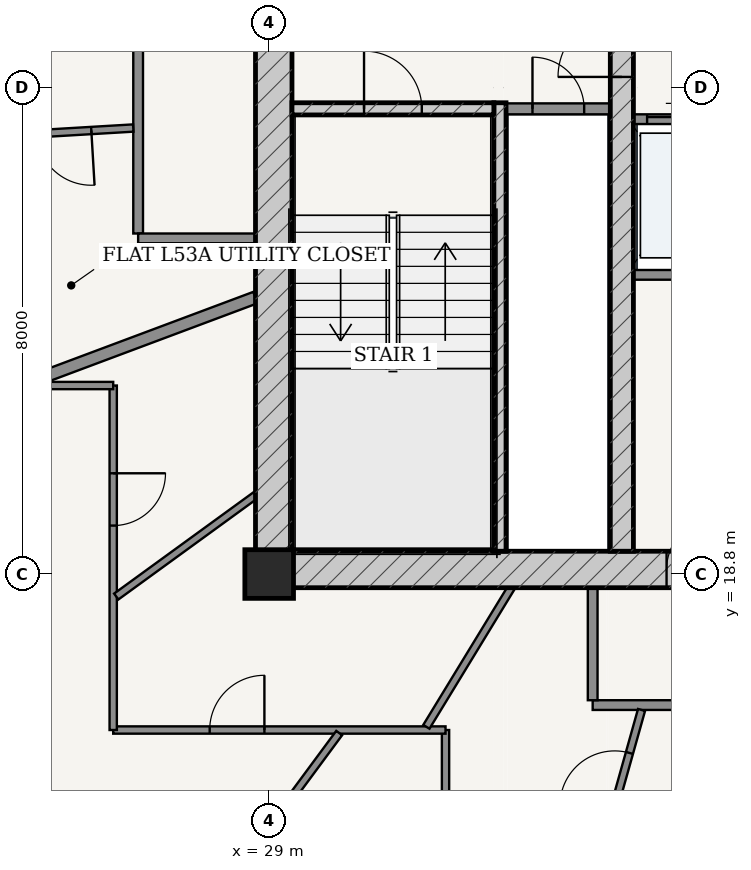
"""IFC4 building model, lengths in metres.
Left out: names, types, materials, properties, quantities, classifications, styles, units other than length and angle.
Written with IfcOpenShell. Run it as: python <this file> out.ifc"""

import sys

from ifc_helpers import new_model, si_unit, direction, frame, frame_2d, origin, origin_2d, place, context, subcontext, project, spatial, rectangle, extrude, source, transform, mapped, element, fill, save


model = new_model("IFC4")
c1 = context("Model", 3, precision=1e-05, world=origin(), true_north=direction((-0.2419218956, 0.970295726276)))
c2 = subcontext(c1, "Body", "Model", "MODEL_VIEW")
j1 = project(units=[si_unit("LENGTHUNIT", "METRE"), si_unit("PLANEANGLEUNIT", "RADIAN")], contexts=[c1])
p1 = place(None, origin())
s1 = spatial("IfcSite", under=j1, at=p1, CompositionType="ELEMENT")
p2 = place(p1, origin())
s2 = spatial("IfcBuilding", under=s1, at=p2, CompositionType="ELEMENT")
p3 = place(p2, frame((0.0, 0.0, 202.3)))
s3 = spatial("IfcBuildingStorey", under=s2, at=p3, CompositionType="ELEMENT", Elevation=202.3)
p4 = place(p3, frame((29.0, 18.8, 0.0), z_axis=(0.0, 0.0, 1.0), x_axis=(1.0, 0.0, 0.0)))
e1 = element("IfcColumn", 1, at=p4, inside=s3, PredefinedType="COLUMN", context=c2, shape_type="SweptSolid", body=[
    extrude(rectangle(XDim=0.8, YDim=0.8, at=origin_2d()), origin(), (0.0, 0.0, 1.0), 3.7),
])
p5 = place(p3, frame((28.775, 18.875, 0.0), z_axis=(0.0, 0.0, 1.0), x_axis=(1.0, 0.0, 0.0)))
e2 = element("IfcWall", 2, at=p5, inside=s3, PredefinedType="SHEAR", context=c2, shape_type="SweptSolid", body=[
    extrude(rectangle(XDim=18.45, YDim=0.6, at=frame_2d((9.225, 0.0))), origin(), (0.0, 0.0, 1.0), 3.435),
])
p6 = place(p5, frame((6.76, 0.0, 0.0)))
e3 = element("IfcOpeningElement", 3, at=p6, cuts=e2, PredefinedType="OPENING", context=c2, shape_type="SweptSolid", body=[
    extrude(rectangle(XDim=0.85, YDim=2.1, at=frame_2d((0.425, 1.05))), frame((0.0, 0.31, 0.0), z_axis=(0.0, -1.0, 0.0), x_axis=(1.0, 0.0, 0.0)), (0.0, 0.0, 1.0), 0.62),
])
p7 = place(p5, frame((8.8, 0.0, 0.0)))
e4 = element("IfcOpeningElement", 4, at=p7, cuts=e2, PredefinedType="OPENING", context=c2, shape_type="SweptSolid", body=[
    extrude(rectangle(XDim=0.85, YDim=2.1, at=frame_2d((0.425, 1.05))), frame((0.0, 0.31, 0.0), z_axis=(0.0, -1.0, 0.0), x_axis=(1.0, 0.0, 0.0)), (0.0, 0.0, 1.0), 0.62),
])
p8 = place(p5, frame((10.84, 0.0, 0.0)))
e5 = element("IfcOpeningElement", 5, at=p8, cuts=e2, PredefinedType="OPENING", context=c2, shape_type="SweptSolid", body=[
    extrude(rectangle(XDim=0.85, YDim=2.1, at=frame_2d((0.425, 1.05))), frame((0.0, 0.31, 0.0), z_axis=(0.0, -1.0, 0.0), x_axis=(1.0, 0.0, 0.0)), (0.0, 0.0, 1.0), 0.62),
])
p9 = place(p3, frame((29.075, 19.175, 0.0), z_axis=(0.0, 0.0, 1.0), x_axis=(0.0, 1.0, 0.0)))
e6 = element("IfcWall", 6, at=p9, inside=s3, PredefinedType="SHEAR", context=c2, shape_type="SweptSolid", body=[
    extrude(rectangle(XDim=15.25, YDim=0.6, at=frame_2d((7.625, 0.0))), origin(), (0.0, 0.0, 1.0), 3.435),
])
p10 = place(p9, frame((9.875, 0.0, 0.0)))
e7 = element("IfcOpeningElement", 7, at=p10, cuts=e6, PredefinedType="OPENING", context=c2, shape_type="SweptSolid", body=[
    extrude(rectangle(XDim=1.5, YDim=2.2, at=frame_2d((0.75, 1.1))), frame((0.0, 0.31, 0.0), z_axis=(0.0, -1.0, 0.0), x_axis=(1.0, 0.0, 0.0)), (0.0, 0.0, 1.0), 0.62),
])
p11 = place(p3, frame((32.795, 19.175, 0.0), z_axis=(0.0, 0.0, 1.0), x_axis=(0.0, 1.0, 0.0)))
e8 = element("IfcWall", 8, at=p11, inside=s3, PredefinedType="SOLIDWALL", context=c2, shape_type="SweptSolid", body=[
    extrude(rectangle(XDim=7.375, YDim=0.2, at=frame_2d((3.688, 0.0))), origin(), (0.0, 0.0, 1.0), 3.435),
])
p12 = place(p3, frame((29.375, 26.45, 0.0), z_axis=(0.0, 0.0, 1.0), x_axis=(1.0, 0.0, 0.0)))
e9 = element("IfcWall", 9, at=p12, inside=s3, PredefinedType="SOLIDWALL", context=c2, shape_type="SweptSolid", body=[
    extrude(rectangle(XDim=3.32, YDim=0.2, at=frame_2d((1.66, 0.0))), origin(), (0.0, 0.0, 1.0), 3.435),
])
p13 = place(p12, frame((1.185, 0.0, 0.0)))
e10 = element("IfcOpeningElement", 10, at=p13, cuts=e9, PredefinedType="OPENING", context=c2, shape_type="SweptSolid", body=[
    extrude(rectangle(XDim=0.95, YDim=2.15, at=frame_2d((0.475, 1.075))), frame((0.0, 0.11, 0.0), z_axis=(0.0, -1.0, 0.0), x_axis=(1.0, 0.0, 0.0)), (0.0, 0.0, 1.0), 0.22),
])
p14 = place(p3, frame((34.8, 19.175, 0.0), z_axis=(0.0, 0.0, 1.0), x_axis=(0.0, 1.0, 0.0)))
e11 = element("IfcWall", 11, at=p14, inside=s3, PredefinedType="SHEAR", context=c2, shape_type="SweptSolid", body=[
    extrude(rectangle(XDim=15.25, YDim=0.38, at=frame_2d((7.625, 0.0))), origin(), (0.0, 0.0, 1.0), 3.435),
])
p15 = place(p14, frame((7.8, 0.0, 0.0)))
e12 = element("IfcOpeningElement", 12, at=p15, cuts=e11, PredefinedType="OPENING", context=c2, shape_type="SweptSolid", body=[
    extrude(rectangle(XDim=1.05, YDim=2.15, at=frame_2d((0.525, 1.075))), frame((0.0, 0.2, 0.0), z_axis=(0.0, -1.0, 0.0), x_axis=(1.0, 0.0, 0.0)), (0.0, 0.0, 1.0), 0.4),
])
p16 = place(p3, frame((32.9, 26.45, 0.0), z_axis=(0.0, 0.0, 1.0), x_axis=(1.0, 0.0, 0.0)))
e13 = element("IfcWall", 13, at=p16, inside=s3, PredefinedType="PARTITIONING", context=c2, shape_type="SweptSolid", body=[
    extrude(rectangle(XDim=1.71, YDim=0.18, at=frame_2d((0.855, 0.0))), origin(), (0.0, 0.0, 1.0), 3.435),
])
p17 = place(p16, frame((0.43, 0.0, 0.0)))
e14 = element("IfcOpeningElement", 14, at=p17, cuts=e13, PredefinedType="OPENING", context=c2, shape_type="SweptSolid", body=[
    extrude(rectangle(XDim=0.85, YDim=2.1, at=frame_2d((0.425, 1.05))), frame((0.0, 0.1, 0.0), z_axis=(0.0, -1.0, 0.0), x_axis=(1.0, 0.0, 0.0)), (0.0, 0.0, 1.0), 0.2),
])
p18 = place(p3, frame((34.99, 26.28, 0.0), z_axis=(0.0, 0.0, 1.0), x_axis=(1.0, 0.0, 0.0)))
e15 = element("IfcWall", 15, at=p18, inside=s3, PredefinedType="PARTITIONING", context=c2, shape_type="SweptSolid", body=[
    extrude(rectangle(XDim=6.02, YDim=0.16, at=frame_2d((3.01, 0.0))), origin(), (0.0, 0.0, 1.0), 3.435),
])
p19 = place(p18, frame((0.225, 0.0, 0.0)))
e16 = element("IfcOpeningElement", 16, at=p19, cuts=e15, PredefinedType="OPENING", context=c2, shape_type="SweptSolid", body=[
    extrude(rectangle(XDim=1.1, YDim=2.2, at=frame_2d((0.55, 1.1))), frame((0.0, 0.09, 0.0), z_axis=(0.0, -1.0, 0.0), x_axis=(1.0, 0.0, 0.0)), (0.0, 0.0, 1.0), 0.18),
])
p20 = place(p18, frame((1.705, 0.0, 0.0)))
e17 = element("IfcOpeningElement", 17, at=p20, cuts=e15, PredefinedType="OPENING", context=c2, shape_type="SweptSolid", body=[
    extrude(rectangle(XDim=1.1, YDim=2.2, at=frame_2d((0.55, 1.1))), frame((0.0, 0.09, 0.0), z_axis=(0.0, -1.0, 0.0), x_axis=(1.0, 0.0, 0.0)), (0.0, 0.0, 1.0), 0.18),
])
p21 = place(p3, frame((34.99, 23.72, 0.0), z_axis=(0.0, 0.0, 1.0), x_axis=(1.0, 0.0, 0.0)))
e18 = element("IfcWall", 18, at=p21, inside=s3, PredefinedType="PARTITIONING", context=c2, shape_type="SweptSolid", body=[
    extrude(rectangle(XDim=6.02, YDim=0.16, at=frame_2d((3.01, 0.0))), origin(), (0.0, 0.0, 1.0), 3.435),
])
p22 = place(p3, frame((26.845, 24.4, 0.0), z_axis=(0.0, 0.0, 1.0), x_axis=(0.0, 1.0, 0.0)))
e19 = element("IfcWall", 19, at=p22, inside=s3, PredefinedType="PARTITIONING", context=c2, shape_type="SweptSolid", body=[
    extrude(rectangle(XDim=10.625, YDim=0.16, at=frame_2d((5.312, 0.0))), origin(), (0.0, 0.0, 1.0), 2.951),
])
p23 = place(p22, frame((6.927, 0.0, 0.0)))
e20 = element("IfcOpeningElement", 20, at=p23, cuts=e19, PredefinedType="OPENING", context=c2, shape_type="SweptSolid", body=[
    extrude(rectangle(XDim=0.98, YDim=2.2, at=frame_2d((0.49, 1.1))), frame((0.0, 0.09, 0.0), z_axis=(0.0, -1.0, 0.0), x_axis=(1.0, 0.0, 0.0)), (0.0, 0.0, 1.0), 0.18),
])
p24 = place(p3, frame((26.845, 24.32, 0.0), z_axis=(0.0, 0.0, 1.0), x_axis=(1.0, 0.0, 0.0)))
e21 = element("IfcWall", 21, at=p24, inside=s3, PredefinedType="PARTITIONING", context=c2, shape_type="SweptSolid", body=[
    extrude(rectangle(XDim=1.93, YDim=0.16, at=frame_2d((0.965, 0.0))), origin(), (0.0, 0.0, 1.0), 3.435),
])
p25 = place(p3, frame((34.32, 16.645, 0.0), z_axis=(0.0, 0.0, 1.0), x_axis=(1.0, 0.0, 0.0)))
e22 = element("IfcWall", 22, at=p25, inside=s3, PredefinedType="PARTITIONING", context=c2, shape_type="SweptSolid", body=[
    extrude(rectangle(XDim=14.835, YDim=0.16, at=frame_2d((7.417, 0.0))), origin(), (0.0, 0.0, 1.0), 2.951),
])
p26 = place(p25, frame((11.426, 0.0, 0.0)))
e23 = element("IfcOpeningElement", 23, at=p26, cuts=e22, PredefinedType="OPENING", context=c2, shape_type="SweptSolid", body=[
    extrude(rectangle(XDim=0.98, YDim=2.2, at=frame_2d((0.49, 1.1))), frame((0.0, 0.09, 0.0), z_axis=(0.0, -1.0, 0.0), x_axis=(1.0, 0.0, 0.0)), (0.0, 0.0, 1.0), 0.18),
])
p27 = place(p3, frame((34.32, 16.725, 0.0), z_axis=(0.0, 0.0, 1.0), x_axis=(0.0, 1.0, 0.0)))
e24 = element("IfcWall", 24, at=p27, inside=s3, PredefinedType="PARTITIONING", context=c2, shape_type="SweptSolid", body=[
    extrude(rectangle(XDim=1.85, YDim=0.16, at=frame_2d((0.925, 0.0))), origin(), (0.0, 0.0, 1.0), 3.435),
])
p28 = place(p3, frame((26.765, 26.135, 0.0), z_axis=(0.0, 0.0, 1.0), x_axis=(-0.998248453424, -0.059161011118, 0.0)))
e25 = element("IfcWall", 25, at=p28, inside=s3, PredefinedType="PARTITIONING", context=c2, shape_type="SweptSolid", body=[
    extrude(rectangle(XDim=2.282, YDim=0.12, at=frame_2d((1.141, 0.0))), origin(), (0.0, 0.0, 1.0), 3.435),
])
p29 = place(p28, frame((0.691, 0.0, 0.0)))
e26 = element("IfcOpeningElement", 26, at=p29, cuts=e25, PredefinedType="OPENING", context=c2, shape_type="SweptSolid", body=[
    extrude(rectangle(XDim=0.9, YDim=2.15, at=frame_2d((0.45, 1.075))), frame((0.0, 0.07, 0.0), z_axis=(0.0, -1.0, 0.0), x_axis=(1.0, 0.0, 0.0)), (0.0, 0.0, 1.0), 0.14),
])
p30 = place(p3, frame((28.775, 23.347, 0.0), z_axis=(0.0, 0.0, 1.0), x_axis=(-0.936537569358, -0.350567227761, 0.0)))
e27 = element("IfcWall", 27, at=p30, inside=s3, PredefinedType="PARTITIONING", context=c2, shape_type="SweptSolid", body=[
    extrude(rectangle(XDim=11.594, YDim=0.2, at=frame_2d((5.797, 0.0))), origin(), (0.0, 0.0, 1.0), 2.951),
])
p31 = place(p3, frame((31.9, 14.225, 0.0), z_axis=(0.0, 0.0, 1.0), x_axis=(0.0, 1.0, 0.0)))
e28 = element("IfcWall", 28, at=p31, inside=s3, PredefinedType="PARTITIONING", context=c2, shape_type="SweptSolid", body=[
    extrude(rectangle(XDim=2.01, YDim=0.12, at=frame_2d((1.005, 0.0))), origin(), (0.0, 0.0, 1.0), 3.11),
])
p32 = place(p3, frame((31.9, 16.235, 0.0), z_axis=(0.0, 0.0, 1.0), x_axis=(-1.0, 0.0, 0.0)))
e29 = element("IfcWall", 29, at=p32, inside=s3, PredefinedType="PARTITIONING", context=c2, shape_type="SweptSolid", body=[
    extrude(rectangle(XDim=5.465, YDim=0.12, at=frame_2d((2.732, 0.0))), origin(), (0.0, 0.0, 1.0), 2.951),
])
p33 = place(p32, frame((2.979, 0.0, 0.0)))
e30 = element("IfcOpeningElement", 30, at=p33, cuts=e29, PredefinedType="OPENING", context=c2, shape_type="SweptSolid", body=[
    extrude(rectangle(XDim=0.9, YDim=2.15, at=frame_2d((0.45, 1.075))), frame((0.0, 0.07, 0.0), z_axis=(0.0, -1.0, 0.0), x_axis=(1.0, 0.0, 0.0)), (0.0, 0.0, 1.0), 0.14),
])
p34 = place(p3, frame((26.435, 16.235, 0.0), z_axis=(0.0, 0.0, 1.0), x_axis=(0.0, 1.0, 0.0)))
e31 = element("IfcWall", 31, at=p34, inside=s3, PredefinedType="PARTITIONING", context=c2, shape_type="SweptSolid", body=[
    extrude(rectangle(XDim=5.665, YDim=0.12, at=frame_2d((2.833, 0.0))), origin(), (0.0, 0.0, 1.0), 2.951),
])
p35 = place(p34, frame((3.362, 0.0, 0.0)))
e32 = element("IfcOpeningElement", 32, at=p35, cuts=e31, PredefinedType="OPENING", context=c2, shape_type="SweptSolid", body=[
    extrude(rectangle(XDim=0.86, YDim=2.15, at=frame_2d((0.43, 1.075))), frame((0.0, 0.07, 0.0), z_axis=(0.0, -1.0, 0.0), x_axis=(1.0, 0.0, 0.0)), (0.0, 0.0, 1.0), 0.14),
])
p36 = place(p3, frame((26.435, 21.9, 0.0), z_axis=(0.0, 0.0, 1.0), x_axis=(-1.0, 0.0, 0.0)))
e33 = element("IfcWall", 33, at=p36, inside=s3, PredefinedType="PARTITIONING", context=c2, shape_type="SweptSolid", body=[
    extrude(rectangle(XDim=1.526, YDim=0.12, at=frame_2d((0.763, 0.0))), origin(), (0.0, 0.0, 1.0), 3.435),
])
p37 = place(p3, frame((30.151, 16.185, 0.0), z_axis=(0.0, 0.0, 1.0), x_axis=(-0.594540664599, -0.804065543434, 0.0)))
e34 = element("IfcWall", 34, at=p37, inside=s3, PredefinedType="PARTITIONING", context=c2, shape_type="SweptSolid", body=[
    extrude(rectangle(XDim=7.066, YDim=0.12, at=frame_2d((3.533, 0.0))), origin(), (0.0, 0.0, 1.0), 2.951),
])
p38 = place(p37, frame((2.075, 0.0, 0.0)))
e35 = element("IfcOpeningElement", 35, at=p38, cuts=e34, PredefinedType="OPENING", context=c2, shape_type="SweptSolid", body=[
    extrude(rectangle(XDim=0.9, YDim=2.15, at=frame_2d((0.45, 1.075))), frame((0.0, 0.07, 0.0), z_axis=(0.0, -1.0, 0.0), x_axis=(1.0, 0.0, 0.0)), (0.0, 0.0, 1.0), 0.14),
])
p39 = place(p3, frame((28.775, 20.094, 0.0), z_axis=(0.0, 0.0, 1.0), x_axis=(-0.808862864425, -0.587997335499, 0.0)))
e36 = element("IfcWall", 36, at=p39, inside=s3, PredefinedType="PARTITIONING", context=c2, shape_type="SweptSolid", body=[
    extrude(rectangle(XDim=2.831, YDim=0.12, at=frame_2d((1.416, 0.0))), origin(), (0.0, 0.0, 1.0), 3.435),
])
p40 = place(p3, frame((32.981, 18.575, 0.0), z_axis=(0.0, 0.0, 1.0), x_axis=(-0.520926540997, -0.853601510592, 0.0)))
e37 = element("IfcWall", 37, at=p40, inside=s3, PredefinedType="PARTITIONING", context=c2, shape_type="SweptSolid", body=[
    extrude(rectangle(XDim=2.679, YDim=0.12, at=frame_2d((1.34, 0.0))), origin(), (0.0, 0.0, 1.0), 3.435),
])
p41 = place(p3, frame((35.124, 16.565, 0.0), z_axis=(0.0, 0.0, 1.0), x_axis=(-0.270566477163, -0.962701293982, 0.0)))
e38 = element("IfcWall", 38, at=p41, inside=s3, PredefinedType="PARTITIONING", context=c2, shape_type="SweptSolid", body=[
    extrude(rectangle(XDim=2.369, YDim=0.12, at=frame_2d((1.184, 0.0))), origin(), (0.0, 0.0, 1.0), 3.435),
])
p42 = place(p41, frame((0.734, 0.0, 0.0)))
e39 = element("IfcOpeningElement", 39, at=p42, cuts=e38, PredefinedType="OPENING", context=c2, shape_type="SweptSolid", body=[
    extrude(rectangle(XDim=0.9, YDim=2.15, at=frame_2d((0.45, 1.075))), frame((0.0, 0.07, 0.0), z_axis=(0.0, -1.0, 0.0), x_axis=(1.0, 0.0, 0.0)), (0.0, 0.0, 1.0), 0.14),
])
m1 = source(origin(), c2, "Body", "SweptSolid", [
    extrude(rectangle(XDim=1.05, YDim=2.15, at=frame_2d((0.525, 1.075))), frame((0.0, 0.025, 0.0), z_axis=(0.0, -1.0, 0.0), x_axis=(1.0, 0.0, 0.0)), (0.0, 0.0, 1.0), 0.05),
])
p43 = place(p15, origin())
e40 = element("IfcDoor", 40, at=p43, inside=s3, OperationType="SINGLE_SWING_LEFT", PredefinedType="DOOR", context=c2, shape_type="MappedRepresentation", body=[
    mapped(m1, transform((0.0, 0.0, 0.0), scale=1.0)),
])
fill(e12, e40)
m2 = source(origin(), c2, "Body", "SweptSolid", [
    extrude(rectangle(XDim=0.95, YDim=2.15, at=frame_2d((0.475, 1.075))), frame((0.0, 0.025, 0.0), z_axis=(0.0, -1.0, 0.0), x_axis=(1.0, 0.0, 0.0)), (0.0, 0.0, 1.0), 0.05),
])
p44 = place(p13, origin())
e41 = element("IfcDoor", 41, at=p44, inside=s3, OperationType="SINGLE_SWING_LEFT", PredefinedType="DOOR", context=c2, shape_type="MappedRepresentation", body=[
    mapped(m2, transform((0.0, 0.0, 0.0), scale=1.0)),
])
fill(e10, e41)
m3 = source(origin(), c2, "Body", "SweptSolid", [
    extrude(rectangle(XDim=0.85, YDim=2.1, at=frame_2d((0.425, 1.05))), frame((0.0, 0.025, 0.0), z_axis=(0.0, -1.0, 0.0), x_axis=(1.0, 0.0, 0.0)), (0.0, 0.0, 1.0), 0.05),
])
p45 = place(p17, origin())
e42 = element("IfcDoor", 42, at=p45, inside=s3, OperationType="SINGLE_SWING_LEFT", PredefinedType="DOOR", context=c2, shape_type="MappedRepresentation", body=[
    mapped(m3, transform((0.0, 0.0, 0.0), scale=1.0)),
])
fill(e14, e42)
p46 = place(p6, origin())
e43 = element("IfcDoor", 43, at=p46, inside=s3, OperationType="SINGLE_SWING_RIGHT", PredefinedType="DOOR", context=c2, shape_type="MappedRepresentation", body=[
    mapped(m3, transform((0.0, 0.0, 0.0), scale=1.0)),
])
fill(e3, e43)
m4 = source(origin(), c2, "Body", "SweptSolid", [
    extrude(rectangle(XDim=1.1, YDim=2.2, at=frame_2d((0.55, 1.1))), frame((0.0, 0.025, 0.0), z_axis=(0.0, -1.0, 0.0), x_axis=(1.0, 0.0, 0.0)), (0.0, 0.0, 1.0), 0.05),
])
p47 = place(p19, origin())
e44 = element("IfcDoor", 44, at=p47, inside=s3, OperationType="DOUBLE_DOOR_SLIDING", PredefinedType="DOOR", context=c2, shape_type="MappedRepresentation", body=[
    mapped(m4, transform((0.0, 0.0, 0.0), scale=1.0)),
])
fill(e16, e44)
m5 = source(origin(), c2, "Body", "SweptSolid", [
    extrude(rectangle(XDim=0.9, YDim=2.15, at=frame_2d((0.45, 1.075))), frame((0.0, 0.025, 0.0), z_axis=(0.0, -1.0, 0.0), x_axis=(1.0, 0.0, 0.0)), (0.0, 0.0, 1.0), 0.05),
])
p48 = place(p29, origin())
e45 = element("IfcDoor", 45, at=p48, inside=s3, OperationType="SINGLE_SWING_LEFT", PredefinedType="DOOR", context=c2, shape_type="MappedRepresentation", body=[
    mapped(m5, transform((0.0, 0.0, 0.0), scale=1.0)),
])
fill(e26, e45)
p49 = place(p42, frame((0.9, 0.0, 0.0), z_axis=(0.0, 0.0, 1.0), x_axis=(-1.0, 0.0, 0.0)))
e46 = element("IfcDoor", 46, at=p49, inside=s3, OperationType="SINGLE_SWING_LEFT", PredefinedType="DOOR", context=c2, shape_type="MappedRepresentation", body=[
    mapped(m5, transform((0.0, 0.0, 0.0), scale=1.0)),
])
fill(e39, e46)
m6 = source(origin(), c2, "Body", "SweptSolid", [
    extrude(rectangle(XDim=0.86, YDim=2.15, at=frame_2d((0.43, 1.075))), frame((0.0, 0.025, 0.0), z_axis=(0.0, -1.0, 0.0), x_axis=(1.0, 0.0, 0.0)), (0.0, 0.0, 1.0), 0.05),
])
p50 = place(p35, frame((0.86, 0.0, 0.0), z_axis=(0.0, 0.0, 1.0), x_axis=(-1.0, 0.0, 0.0)))
e47 = element("IfcDoor", 47, at=p50, inside=s3, OperationType="SINGLE_SWING_LEFT", PredefinedType="DOOR", context=c2, shape_type="MappedRepresentation", body=[
    mapped(m6, transform((0.0, 0.0, 0.0), scale=1.0)),
])
fill(e32, e47)
p51 = place(p33, frame((0.9, 0.0, 0.0), z_axis=(0.0, 0.0, 1.0), x_axis=(-1.0, 0.0, 0.0)))
e48 = element("IfcDoor", 48, at=p51, inside=s3, OperationType="SINGLE_SWING_RIGHT", PredefinedType="DOOR", context=c2, shape_type="MappedRepresentation", body=[
    mapped(m5, transform((0.0, 0.0, 0.0), scale=1.0)),
])
fill(e30, e48)
save(model, sys.argv[1])
